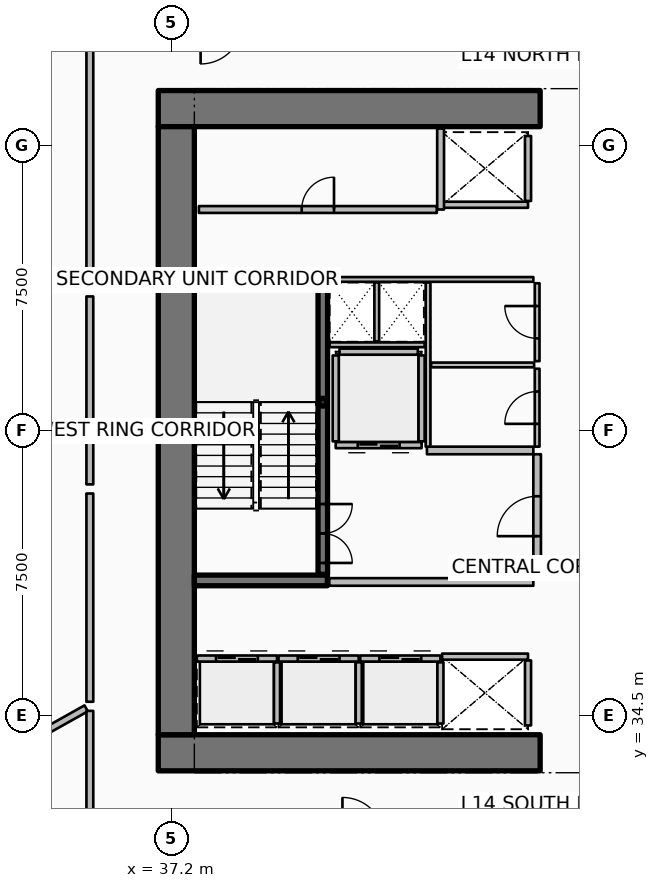
"""IFC4 building model, lengths in metres.
Left out: names, types, materials, properties, quantities, classifications, styles, units other than length and angle.
Written with IfcOpenShell. Run it as: python <this file> out.ifc"""

import sys

from ifc_helpers import new_model, si_unit, direction, frame, frame_2d, origin, origin_2d, place, context, subcontext, project, spatial, rectangle, hollow_rectangle, extrude, element, fill, save


model = new_model("IFC4")
c1 = context("Model", 3, precision=1e-05, world=origin(), true_north=direction((0.0, 1.0)))
c2 = subcontext(c1, "Body", "Model", "MODEL_VIEW")
j1 = project(units=[si_unit("LENGTHUNIT", "METRE"), si_unit("PLANEANGLEUNIT", "RADIAN")], contexts=[c1])
p1 = place(None, origin())
s1 = spatial("IfcSite", under=j1, at=p1, CompositionType="ELEMENT")
p2 = place(p1, origin())
s2 = spatial("IfcBuilding", under=s1, at=p2, CompositionType="ELEMENT")
p3 = place(p2, frame((0.0, 0.0, 60.15)))
s3 = spatial("IfcBuildingStorey", under=s2, at=p3, CompositionType="ELEMENT", Elevation=60.15)
for number, where, z_axis, x_axis in (
    (1, (36.85, 33.525, 0.0), (0.0, 0.0, 1.0), (1.0, 0.0, 0.0)),
    (2, (36.85, 50.475, 0.0), (0.0, 0.0, 1.0), (1.0, 0.0, 0.0)),
):
    element("IfcWall", number, at=place(p3, frame(where, z_axis=z_axis, x_axis=x_axis)), inside=s3, PredefinedType="SHEAR", context=c2, shape_type="SweptSolid", body=[
        extrude(rectangle(XDim=10.05, YDim=0.95, at=frame_2d((5.025, 0.0))), origin(), (0.0, 0.0, 1.0), 3.75),
    ])
p4 = place(p3, frame((37.325, 34.0, 0.0), z_axis=(0.0, 0.0, 1.0), x_axis=(0.0, 1.0, 0.0)))
e3 = element("IfcWall", 3, at=p4, inside=s3, PredefinedType="SHEAR", context=c2, shape_type="SweptSolid", body=[
    extrude(rectangle(XDim=16.0, YDim=0.95, at=frame_2d((8.0, 0.0))), origin(), (0.0, 0.0, 1.0), 3.75),
])
for number, where, z_axis, x_axis in (
    (4, (37.8, 38.06, 0.0), (0.0, 0.0, 1.0), (1.0, 0.0, 0.0)),
    (5, (37.8, 45.94, 0.0), (0.0, 0.0, 1.0), (1.0, 0.0, 0.0)),
):
    element("IfcWall", number, at=place(p3, frame(where, z_axis=z_axis, x_axis=x_axis)), inside=s3, PredefinedType="SHEAR", context=c2, shape_type="SweptSolid", body=[
        extrude(rectangle(XDim=3.5, YDim=0.28, at=frame_2d((1.75, 0.0))), origin(), (0.0, 0.0, 1.0), 3.75),
    ])
p5 = place(p3, frame((41.18, 42.75, 0.0), z_axis=(0.0, 0.0, 1.0), x_axis=(1.0, 0.0, 0.0)))
e6 = element("IfcColumn", 6, at=p5, inside=s3, PredefinedType="COLUMN", context=c2, shape_type="SweptSolid", body=[
    extrude(hollow_rectangle(XDim=0.2, YDim=0.2, WallThickness=0.01, InnerFilletRadius=0.01, OuterFilletRadius=0.02, at=origin_2d()), origin(), (0.0, 0.0, 1.0), 1.67),
])
p6 = place(p3, frame((41.18, 38.22, 0.0), z_axis=(0.0, 0.0, 1.0), x_axis=(0.0, 1.0, 0.0)))
e7 = element("IfcWall", 7, at=p6, inside=s3, PredefinedType="SOLIDWALL", context=c2, shape_type="SweptSolid", body=[
    extrude(rectangle(XDim=7.56, YDim=0.25, at=frame_2d((3.78, 0.0))), origin(), (0.0, 0.0, 1.0), 3.5),
])
p7 = place(p6, frame((0.3, 0.0, 0.0)))
e8 = element("IfcOpeningElement", 8, at=p7, cuts=e7, PredefinedType="OPENING", context=c2, shape_type="SweptSolid", body=[
    extrude(rectangle(XDim=1.55, YDim=2.15, at=frame_2d((0.775, 1.075))), frame((0.0, 0.135, 0.0), z_axis=(0.0, -1.0, 0.0), x_axis=(1.0, 0.0, 0.0)), (0.0, 0.0, 1.0), 0.27),
])
p8 = place(p3, frame((37.865, 36.005, 0.0), z_axis=(0.0, 0.0, 1.0), x_axis=(1.0, 0.0, 0.0)))
e9 = element("IfcWall", 9, at=p8, inside=s3, PredefinedType="PARTITIONING", context=c2, shape_type="SweptSolid", body=[
    extrude(rectangle(XDim=2.11, YDim=0.16, at=frame_2d((1.055, 0.0))), origin(), (0.0, 0.0, 1.0), 3.5),
])
p9 = place(p8, frame((0.505, 0.0, 0.0)))
e10 = element("IfcOpeningElement", 10, at=p9, cuts=e9, PredefinedType="OPENING", context=c2, shape_type="SweptSolid", body=[
    extrude(rectangle(XDim=1.1, YDim=2.1, at=frame_2d((0.55, 1.05))), frame((0.0, 0.09, 0.0), z_axis=(0.0, -1.0, 0.0), x_axis=(1.0, 0.0, 0.0)), (0.0, 0.0, 1.0), 0.18),
])
p10 = place(p3, frame((39.975, 34.295, 0.0), z_axis=(0.0, 0.0, 1.0), x_axis=(0.0, 1.0, 0.0)))
e11 = element("IfcWall", 11, at=p10, inside=s3, PredefinedType="PARTITIONING", context=c2, shape_type="SweptSolid", body=[
    extrude(rectangle(XDim=1.61, YDim=0.16, at=frame_2d((0.805, 0.0))), origin(), (0.0, 0.0, 1.0), 3.5),
])
p11 = place(p3, frame((40.015, 36.005, 0.0), z_axis=(0.0, 0.0, 1.0), x_axis=(1.0, 0.0, 0.0)))
e12 = element("IfcWall", 12, at=p11, inside=s3, PredefinedType="PARTITIONING", context=c2, shape_type="SweptSolid", body=[
    extrude(rectangle(XDim=2.11, YDim=0.16, at=frame_2d((1.055, 0.0))), origin(), (0.0, 0.0, 1.0), 3.5),
])
p12 = place(p11, frame((0.505, 0.0, 0.0)))
e13 = element("IfcOpeningElement", 13, at=p12, cuts=e12, PredefinedType="OPENING", context=c2, shape_type="SweptSolid", body=[
    extrude(rectangle(XDim=1.1, YDim=2.1, at=frame_2d((0.55, 1.05))), frame((0.0, 0.09, 0.0), z_axis=(0.0, -1.0, 0.0), x_axis=(1.0, 0.0, 0.0)), (0.0, 0.0, 1.0), 0.18),
])
p13 = place(p3, frame((42.125, 34.295, 0.0), z_axis=(0.0, 0.0, 1.0), x_axis=(0.0, 1.0, 0.0)))
e14 = element("IfcWall", 14, at=p13, inside=s3, PredefinedType="PARTITIONING", context=c2, shape_type="SweptSolid", body=[
    extrude(rectangle(XDim=1.61, YDim=0.16, at=frame_2d((0.805, 0.0))), origin(), (0.0, 0.0, 1.0), 3.5),
])
p14 = place(p3, frame((42.165, 36.005, 0.0), z_axis=(0.0, 0.0, 1.0), x_axis=(1.0, 0.0, 0.0)))
e15 = element("IfcWall", 15, at=p14, inside=s3, PredefinedType="PARTITIONING", context=c2, shape_type="SweptSolid", body=[
    extrude(rectangle(XDim=2.11, YDim=0.16, at=frame_2d((1.055, 0.0))), origin(), (0.0, 0.0, 1.0), 3.5),
])
p15 = place(p14, frame((0.505, 0.0, 0.0)))
e16 = element("IfcOpeningElement", 16, at=p15, cuts=e15, PredefinedType="OPENING", context=c2, shape_type="SweptSolid", body=[
    extrude(rectangle(XDim=1.1, YDim=2.1, at=frame_2d((0.55, 1.05))), frame((0.0, 0.09, 0.0), z_axis=(0.0, -1.0, 0.0), x_axis=(1.0, 0.0, 0.0)), (0.0, 0.0, 1.0), 0.18),
])
p16 = place(p3, frame((44.275, 34.295, 0.0), z_axis=(0.0, 0.0, 1.0), x_axis=(0.0, 1.0, 0.0)))
e17 = element("IfcWall", 17, at=p16, inside=s3, PredefinedType="PARTITIONING", context=c2, shape_type="SweptSolid", body=[
    extrude(rectangle(XDim=1.61, YDim=0.16, at=frame_2d((0.805, 0.0))), origin(), (0.0, 0.0, 1.0), 3.5),
])
p17 = place(p3, frame((46.58, 47.945, 0.0), z_axis=(0.0, 0.0, 1.0), x_axis=(-1.0, 0.0, 0.0)))
e18 = element("IfcWall", 18, at=p17, inside=s3, PredefinedType="PARTITIONING", context=c2, shape_type="SweptSolid", body=[
    extrude(rectangle(XDim=2.26, YDim=0.16, at=frame_2d((1.13, 0.0))), origin(), (0.0, 0.0, 1.0), 3.5),
])
p18 = place(p3, frame((46.58, 48.045, 0.0), z_axis=(0.0, 0.0, 1.0), x_axis=(0.0, 1.0, 0.0)))
e19 = element("IfcWall", 19, at=p18, inside=s3, PredefinedType="PARTITIONING", context=c2, shape_type="SweptSolid", body=[
    extrude(rectangle(XDim=1.71, YDim=0.16, at=frame_2d((0.855, 0.0))), origin(), (0.0, 0.0, 1.0), 3.5),
])
p19 = place(p3, frame((44.32, 36.055, 0.0), z_axis=(0.0, 0.0, 1.0), x_axis=(1.0, 0.0, 0.0)))
e20 = element("IfcWall", 20, at=p19, inside=s3, PredefinedType="PARTITIONING", context=c2, shape_type="SweptSolid", body=[
    extrude(rectangle(XDim=2.26, YDim=0.16, at=frame_2d((1.13, 0.0))), origin(), (0.0, 0.0, 1.0), 3.5),
])
p20 = place(p3, frame((46.58, 34.245, 0.0), z_axis=(0.0, 0.0, 1.0), x_axis=(0.0, 1.0, 0.0)))
e21 = element("IfcWall", 21, at=p20, inside=s3, PredefinedType="PARTITIONING", context=c2, shape_type="SweptSolid", body=[
    extrude(rectangle(XDim=1.71, YDim=0.16, at=frame_2d((0.855, 0.0))), origin(), (0.0, 0.0, 1.0), 3.5),
])
p21 = place(p3, frame((43.78, 41.62, 0.0), z_axis=(0.0, 0.0, 1.0), x_axis=(-1.0, 0.0, 0.0)))
e22 = element("IfcWall", 22, at=p21, inside=s3, PredefinedType="PARTITIONING", context=c2, shape_type="SweptSolid", body=[
    extrude(rectangle(XDim=2.26, YDim=0.16, at=frame_2d((1.13, 0.0))), origin(), (0.0, 0.0, 1.0), 3.5),
])
p22 = place(p21, frame((0.58, 0.0, 0.0)))
e23 = element("IfcOpeningElement", 23, at=p22, cuts=e22, PredefinedType="OPENING", context=c2, shape_type="SweptSolid", body=[
    extrude(rectangle(XDim=1.1, YDim=2.1, at=frame_2d((0.55, 1.05))), frame((0.0, 0.09, 0.0), z_axis=(0.0, -1.0, 0.0), x_axis=(1.0, 0.0, 0.0)), (0.0, 0.0, 1.0), 0.18),
])
for number, where, z_axis, x_axis in (
    (24, (43.78, 41.72, 0.0), (0.0, 0.0, 1.0), (0.0, 1.0, 0.0)),
    (25, (41.52, 41.72, 0.0), (0.0, 0.0, 1.0), (0.0, 1.0, 0.0)),
):
    element("IfcWall", number, at=place(p3, frame(where, z_axis=z_axis, x_axis=x_axis)), inside=s3, PredefinedType="PARTITIONING", context=c2, shape_type="SweptSolid", body=[
        extrude(rectangle(XDim=2.26, YDim=0.16, at=frame_2d((1.13, 0.0))), origin(), (0.0, 0.0, 1.0), 3.5),
    ])
p23 = place(p3, frame((41.62, 44.08, 0.0), z_axis=(0.0, 0.0, 1.0), x_axis=(1.0, 0.0, 0.0)))
e26 = element("IfcWall", 26, at=p23, inside=s3, PredefinedType="PARTITIONING", context=c2, shape_type="SweptSolid", body=[
    extrude(rectangle(XDim=2.06, YDim=0.16, at=frame_2d((1.03, 0.0))), origin(), (0.0, 0.0, 1.0), 3.5),
])
p24 = place(p3, frame((37.92, 47.82, 0.0), z_axis=(0.0, 0.0, 1.0), x_axis=(1.0, 0.0, 0.0)))
e27 = element("IfcWall", 27, at=p24, inside=s3, PredefinedType="PARTITIONING", context=c2, shape_type="SweptSolid", body=[
    extrude(rectangle(XDim=6.26, YDim=0.18, at=frame_2d((3.13, 0.0))), origin(), (0.0, 0.0, 1.0), 3.5),
])
p25 = place(p24, frame((2.705, 0.0, 0.0)))
e28 = element("IfcOpeningElement", 28, at=p25, cuts=e27, PredefinedType="OPENING", context=c2, shape_type="SweptSolid", body=[
    extrude(rectangle(XDim=0.85, YDim=2.06, at=frame_2d((0.425, 1.03))), frame((0.0, 0.1, 0.0), z_axis=(0.0, -1.0, 0.0), x_axis=(1.0, 0.0, 0.0)), (0.0, 0.0, 1.0), 0.2),
])
p26 = place(p3, frame((44.28, 47.82, 0.0), z_axis=(0.0, 0.0, 1.0), x_axis=(0.0, 1.0, 0.0)))
e29 = element("IfcWall", 29, at=p26, inside=s3, PredefinedType="PARTITIONING", context=c2, shape_type="SweptSolid", body=[
    extrude(rectangle(XDim=2.13, YDim=0.18, at=frame_2d((1.065, 0.0))), origin(), (0.0, 0.0, 1.0), 3.5),
])
p27 = place(p3, frame((41.35, 38.02, 0.0), z_axis=(0.0, 0.0, 1.0), x_axis=(1.0, 0.0, 0.0)))
e30 = element("IfcWall", 30, at=p27, inside=s3, PredefinedType="PARTITIONING", context=c2, shape_type="SweptSolid", body=[
    extrude(rectangle(XDim=5.37, YDim=0.2, at=frame_2d((2.685, 0.0))), origin(), (0.0, 0.0, 1.0), 3.5),
])
p28 = place(p3, frame((43.92, 41.48, 0.0), z_axis=(0.0, 0.0, 1.0), x_axis=(1.0, 0.0, 0.0)))
e31 = element("IfcWall", 31, at=p28, inside=s3, PredefinedType="PARTITIONING", context=c2, shape_type="SweptSolid", body=[
    extrude(rectangle(XDim=2.8, YDim=0.2, at=frame_2d((1.4, 0.0))), origin(), (0.0, 0.0, 1.0), 3.5),
])
p29 = place(p3, frame((46.82, 38.12, 0.0), z_axis=(0.0, 0.0, 1.0), x_axis=(0.0, 1.0, 0.0)))
e32 = element("IfcWall", 32, at=p29, inside=s3, PredefinedType="PARTITIONING", context=c2, shape_type="SweptSolid", body=[
    extrude(rectangle(XDim=3.26, YDim=0.2, at=frame_2d((1.63, 0.0))), origin(), (0.0, 0.0, 1.0), 3.5),
])
p30 = place(p29, frame((1.105, 0.0, 0.0)))
e33 = element("IfcOpeningElement", 33, at=p30, cuts=e32, PredefinedType="OPENING", context=c2, shape_type="SweptSolid", body=[
    extrude(rectangle(XDim=1.05, YDim=2.1, at=frame_2d((0.525, 1.05))), frame((0.0, 0.11, 0.0), z_axis=(0.0, -1.0, 0.0), x_axis=(1.0, 0.0, 0.0)), (0.0, 0.0, 1.0), 0.22),
])
p31 = place(p3, frame((41.36, 45.98, 0.0), z_axis=(0.0, 0.0, 1.0), x_axis=(1.0, 0.0, 0.0)))
e34 = element("IfcWall", 34, at=p31, inside=s3, PredefinedType="PARTITIONING", context=c2, shape_type="SweptSolid", body=[
    extrude(rectangle(XDim=5.36, YDim=0.125, at=frame_2d((2.68, 0.0))), origin(), (0.0, 0.0, 1.0), 2.94),
])
p32 = place(p3, frame((41.36, 44.26, 0.0), z_axis=(0.0, 0.0, 1.0), x_axis=(1.0, 0.0, 0.0)))
e35 = element("IfcWall", 35, at=p32, inside=s3, PredefinedType="PARTITIONING", context=c2, shape_type="SweptSolid", body=[
    extrude(rectangle(XDim=2.5, YDim=0.125, at=frame_2d((1.25, 0.0))), origin(), (0.0, 0.0, 1.0), 2.94),
])
p33 = place(p3, frame((42.6, 44.35, 0.0), z_axis=(0.0, 0.0, 1.0), x_axis=(0.0, 1.0, 0.0)))
e36 = element("IfcWall", 36, at=p33, inside=s3, PredefinedType="PARTITIONING", context=c2, shape_type="SweptSolid", body=[
    extrude(rectangle(XDim=1.55, YDim=0.125, at=frame_2d((0.775, 0.0))), origin(), (0.0, 0.0, 1.0), 2.94),
])
p34 = place(p3, frame((43.95, 41.58, 0.0), z_axis=(0.0, 0.0, 1.0), x_axis=(0.0, 1.0, 0.0)))
e37 = element("IfcWall", 37, at=p34, inside=s3, PredefinedType="PARTITIONING", context=c2, shape_type="SweptSolid", body=[
    extrude(rectangle(XDim=4.32, YDim=0.125, at=frame_2d((2.16, 0.0))), origin(), (0.0, 0.0, 1.0), 2.94),
])
p35 = place(p3, frame((44.03, 43.73, 0.0), z_axis=(0.0, 0.0, 1.0), x_axis=(1.0, 0.0, 0.0)))
e38 = element("IfcWall", 38, at=p35, inside=s3, PredefinedType="PARTITIONING", context=c2, shape_type="SweptSolid", body=[
    extrude(rectangle(XDim=2.71, YDim=0.125, at=frame_2d((1.355, 0.0))), origin(), (0.0, 0.0, 1.0), 2.94),
])
p36 = place(p3, frame((46.82, 41.58, 0.0), z_axis=(0.0, 0.0, 1.0), x_axis=(0.0, 1.0, 0.0)))
e39 = element("IfcWall", 39, at=p36, inside=s3, PredefinedType="PARTITIONING", context=c2, shape_type="SweptSolid", body=[
    extrude(rectangle(XDim=2.05, YDim=0.125, at=frame_2d((1.025, 0.0))), origin(), (0.0, 0.0, 1.0), 2.94),
])
p37 = place(p36, frame((0.6, 0.0, 0.0)))
e40 = element("IfcOpeningElement", 40, at=p37, cuts=e39, PredefinedType="OPENING", context=c2, shape_type="SweptSolid", body=[
    extrude(rectangle(XDim=0.85, YDim=2.06, at=frame_2d((0.425, 1.03))), frame((0.0, 0.073, 0.0), z_axis=(0.0, -1.0, 0.0), x_axis=(1.0, 0.0, 0.0)), (0.0, 0.0, 1.0), 0.145),
])
p38 = place(p3, frame((46.82, 43.83, 0.0), z_axis=(0.0, 0.0, 1.0), x_axis=(0.0, 1.0, 0.0)))
e41 = element("IfcWall", 41, at=p38, inside=s3, PredefinedType="PARTITIONING", context=c2, shape_type="SweptSolid", body=[
    extrude(rectangle(XDim=2.05, YDim=0.125, at=frame_2d((1.025, 0.0))), origin(), (0.0, 0.0, 1.0), 2.94),
])
p39 = place(p38, frame((0.6, 0.0, 0.0)))
e42 = element("IfcOpeningElement", 42, at=p39, cuts=e41, PredefinedType="OPENING", context=c2, shape_type="SweptSolid", body=[
    extrude(rectangle(XDim=0.85, YDim=2.06, at=frame_2d((0.425, 1.03))), frame((0.0, 0.073, 0.0), z_axis=(0.0, -1.0, 0.0), x_axis=(1.0, 0.0, 0.0)), (0.0, 0.0, 1.0), 0.145),
])
p40 = place(p3, frame((34.954, 34.694, 0.0), z_axis=(0.0, 0.0, 1.0), x_axis=(-0.872493465611, -0.488625779577, 0.0)))
e43 = element("IfcWall", 43, at=p40, inside=s3, PredefinedType="PARTITIONING", context=c2, shape_type="SweptSolid", body=[
    extrude(rectangle(XDim=16.586, YDim=0.18, at=frame_2d((8.293, 0.0))), origin(), (0.0, 0.0, 1.0), 2.867),
])
p41 = place(p3, frame((35.05, 52.089, 0.0), z_axis=(0.0, 0.0, 1.0), x_axis=(0.0, -1.0, 0.0)))
e44 = element("IfcWall", 44, at=p41, inside=s3, PredefinedType="PARTITIONING", context=c2, shape_type="SweptSolid", body=[
    extrude(rectangle(XDim=6.317, YDim=0.18, at=frame_2d((3.158, 0.0))), origin(), (0.0, 0.0, 1.0), 2.867),
])
p42 = place(p3, frame((35.05, 45.532, 0.0), z_axis=(0.0, 0.0, 1.0), x_axis=(0.0, -1.0, 0.0)))
e45 = element("IfcWall", 45, at=p42, inside=s3, PredefinedType="PARTITIONING", context=c2, shape_type="SweptSolid", body=[
    extrude(rectangle(XDim=4.945, YDim=0.18, at=frame_2d((2.472, 0.0))), origin(), (0.0, 0.0, 1.0), 2.867),
])
p43 = place(p3, frame((35.05, 40.347, 0.0), z_axis=(0.0, 0.0, 1.0), x_axis=(0.0, -1.0, 0.0)))
e46 = element("IfcWall", 46, at=p43, inside=s3, PredefinedType="PARTITIONING", context=c2, shape_type="SweptSolid", body=[
    extrude(rectangle(XDim=5.48, YDim=0.18, at=frame_2d((2.74, 0.0))), origin(), (0.0, 0.0, 1.0), 2.867),
])
p44 = place(p3, frame((35.05, 34.628, 0.0), z_axis=(0.0, 0.0, 1.0), x_axis=(0.0, -1.0, 0.0)))
e47 = element("IfcWall", 47, at=p44, inside=s3, PredefinedType="PARTITIONING", context=c2, shape_type="SweptSolid", body=[
    extrude(rectangle(XDim=3.258, YDim=0.18, at=frame_2d((1.629, 0.0))), origin(), (0.0, 0.0, 1.0), 2.867),
])
p45 = place(p7, origin())
e48 = element("IfcDoor", 48, at=p45, inside=s3, OperationType="DOUBLE_DOOR_SINGLE_SWING", PredefinedType="DOOR", context=c2, shape_type="SweptSolid", body=[
    extrude(rectangle(XDim=1.55, YDim=2.15, at=frame_2d((0.775, 1.075))), frame((0.0, 0.025, 0.0), z_axis=(0.0, -1.0, 0.0), x_axis=(1.0, 0.0, 0.0)), (0.0, 0.0, 1.0), 0.05),
])
fill(e8, e48)
p46 = place(p9, origin())
e49 = element("IfcDoor", 49, at=p46, inside=s3, OperationType="DOUBLE_DOOR_SLIDING", PredefinedType="DOOR", context=c2, shape_type="SweptSolid", body=[
    extrude(rectangle(XDim=1.1, YDim=2.1, at=frame_2d((0.55, 1.05))), frame((0.0, 0.025, 0.0), z_axis=(0.0, -1.0, 0.0), x_axis=(1.0, 0.0, 0.0)), (0.0, 0.0, 1.0), 0.05),
])
fill(e10, e49)
p47 = place(p12, origin())
e50 = element("IfcDoor", 50, at=p47, inside=s3, OperationType="DOUBLE_DOOR_SLIDING", PredefinedType="DOOR", context=c2, shape_type="SweptSolid", body=[
    extrude(rectangle(XDim=1.1, YDim=2.1, at=frame_2d((0.55, 1.05))), frame((0.0, 0.025, 0.0), z_axis=(0.0, -1.0, 0.0), x_axis=(1.0, 0.0, 0.0)), (0.0, 0.0, 1.0), 0.05),
])
fill(e13, e50)
p48 = place(p15, origin())
e51 = element("IfcDoor", 51, at=p48, inside=s3, OperationType="DOUBLE_DOOR_SLIDING", PredefinedType="DOOR", context=c2, shape_type="SweptSolid", body=[
    extrude(rectangle(XDim=1.1, YDim=2.1, at=frame_2d((0.55, 1.05))), frame((0.0, 0.025, 0.0), z_axis=(0.0, -1.0, 0.0), x_axis=(1.0, 0.0, 0.0)), (0.0, 0.0, 1.0), 0.05),
])
fill(e16, e51)
p49 = place(p22, origin())
e52 = element("IfcDoor", 52, at=p49, inside=s3, OperationType="DOUBLE_DOOR_SLIDING", PredefinedType="DOOR", context=c2, shape_type="SweptSolid", body=[
    extrude(rectangle(XDim=1.1, YDim=2.1, at=frame_2d((0.55, 1.05))), frame((0.0, 0.025, 0.0), z_axis=(0.0, -1.0, 0.0), x_axis=(1.0, 0.0, 0.0)), (0.0, 0.0, 1.0), 0.05),
])
fill(e23, e52)
p50 = place(p25, origin())
e53 = element("IfcDoor", 53, at=p50, inside=s3, OperationType="SINGLE_SWING_RIGHT", PredefinedType="DOOR", context=c2, shape_type="SweptSolid", body=[
    extrude(rectangle(XDim=0.85, YDim=2.06, at=frame_2d((0.425, 1.03))), frame((0.0, 0.025, 0.0), z_axis=(0.0, -1.0, 0.0), x_axis=(1.0, 0.0, 0.0)), (0.0, 0.0, 1.0), 0.05),
])
fill(e28, e53)
p51 = place(p30, origin())
e54 = element("IfcDoor", 54, at=p51, inside=s3, OperationType="SINGLE_SWING_LEFT", PredefinedType="DOOR", context=c2, shape_type="SweptSolid", body=[
    extrude(rectangle(XDim=1.05, YDim=2.1, at=frame_2d((0.525, 1.05))), frame((0.0, 0.025, 0.0), z_axis=(0.0, -1.0, 0.0), x_axis=(1.0, 0.0, 0.0)), (0.0, 0.0, 1.0), 0.05),
])
fill(e33, e54)
p52 = place(p37, origin())
e55 = element("IfcDoor", 55, at=p52, inside=s3, OperationType="SINGLE_SWING_LEFT", PredefinedType="DOOR", context=c2, shape_type="SweptSolid", body=[
    extrude(rectangle(XDim=0.85, YDim=2.06, at=frame_2d((0.425, 1.03))), frame((0.0, 0.025, 0.0), z_axis=(0.0, -1.0, 0.0), x_axis=(1.0, 0.0, 0.0)), (0.0, 0.0, 1.0), 0.05),
])
fill(e40, e55)
p53 = place(p39, origin())
e56 = element("IfcDoor", 56, at=p53, inside=s3, OperationType="SINGLE_SWING_RIGHT", PredefinedType="DOOR", context=c2, shape_type="SweptSolid", body=[
    extrude(rectangle(XDim=0.85, YDim=2.06, at=frame_2d((0.425, 1.03))), frame((0.0, 0.025, 0.0), z_axis=(0.0, -1.0, 0.0), x_axis=(1.0, 0.0, 0.0)), (0.0, 0.0, 1.0), 0.05),
])
fill(e42, e56)
save(model, sys.argv[1])
